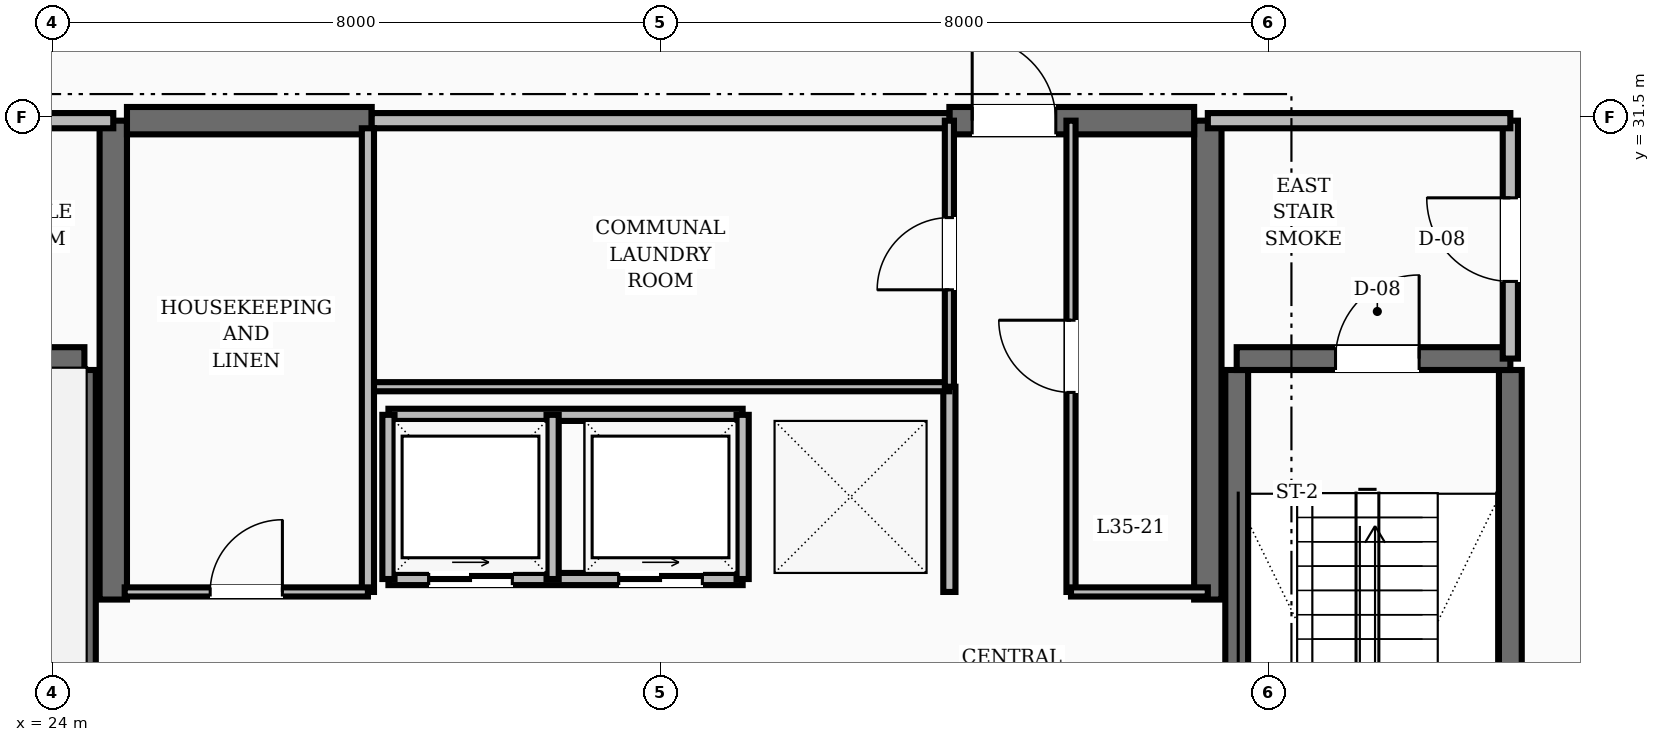
"""IFC4 building model, lengths in metres.
Left out: names, types, materials, properties, quantities, classifications, styles, units other than length and angle.
Written with IfcOpenShell. Run it as: python <this file> out.ifc"""

import sys

from ifc_helpers import new_model, si_unit, direction, frame, frame_2d, origin, place, context, subcontext, project, spatial, rectangle, extrude, element, fill, save


model = new_model("IFC4")
c1 = context("Model", 3, precision=1e-05, world=origin(), true_north=direction((0.0, 1.0)))
c2 = subcontext(c1, "Body", "Model", "MODEL_VIEW")
j1 = project(units=[si_unit("LENGTHUNIT", "METRE"), si_unit("PLANEANGLEUNIT", "RADIAN")], contexts=[c1])
p1 = place(None, origin())
s1 = spatial("IfcSite", under=j1, at=p1, CompositionType="ELEMENT")
p2 = place(p1, origin())
s2 = spatial("IfcBuilding", under=s1, at=p2, CompositionType="ELEMENT")
p3 = place(p2, frame((0.0, 0.0, 138.8)))
s3 = spatial("IfcBuildingStorey", under=s2, at=p3, CompositionType="ELEMENT", Elevation=138.8)
for number, where, z_axis, x_axis in (
    (1, (24.8, 25.15, 0.0), (0.0, 0.0, 1.0), (0.0, 1.0, 0.0)),
    (2, (39.2, 25.15, 0.0), (0.0, 0.0, 1.0), (0.0, 1.0, 0.0)),
):
    element("IfcWall", number, at=place(p3, frame(where, z_axis=z_axis, x_axis=x_axis)), inside=s3, PredefinedType="SHEAR", context=c2, shape_type="SweptSolid", body=[
        extrude(rectangle(XDim=6.3, YDim=0.36, at=frame_2d((3.15, 0.0))), origin(), (0.0, 0.0, 1.0), 3.6),
    ])
p4 = place(p3, frame((24.98, 31.45, 0.0), z_axis=(0.0, 0.0, 1.0), x_axis=(1.0, 0.0, 0.0)))
e3 = element("IfcWall", 3, at=p4, inside=s3, PredefinedType="SHEAR", context=c2, shape_type="SweptSolid", body=[
    extrude(rectangle(XDim=3.22, YDim=0.36, at=frame_2d((1.61, 0.0))), origin(), (0.0, 0.0, 1.0), 3.6),
])
p5 = place(p3, frame((35.8, 31.45, 0.0), z_axis=(0.0, 0.0, 1.0), x_axis=(1.0, 0.0, 0.0)))
e4 = element("IfcWall", 4, at=p5, inside=s3, PredefinedType="SHEAR", context=c2, shape_type="SweptSolid", body=[
    extrude(rectangle(XDim=3.22, YDim=0.36, at=frame_2d((1.61, 0.0))), origin(), (0.0, 0.0, 1.0), 3.6),
])
p6 = place(p5, frame((0.3, 0.0, 0.0)))
e5 = element("IfcOpeningElement", 5, at=p6, cuts=e4, PredefinedType="OPENING", context=c2, shape_type="SweptSolid", body=[
    extrude(rectangle(XDim=1.1, YDim=2.1, at=frame_2d((0.55, 1.05))), frame((0.0, 0.19, 0.0), z_axis=(0.0, -1.0, 0.0), x_axis=(1.0, 0.0, 0.0)), (0.0, 0.0, 1.0), 0.38),
])
p7 = place(p3, frame((24.42, 19.43, 0.0), z_axis=(0.0, 0.0, 1.0), x_axis=(0.0, 1.0, 0.0)))
e6 = element("IfcWall", 6, at=p7, inside=s3, PredefinedType="SHEAR", context=c2, shape_type="SweptSolid", body=[
    extrude(rectangle(XDim=8.74, YDim=0.3, at=frame_2d((4.37, 0.0))), origin(), (0.0, 0.0, 1.0), 3.6),
])
p8 = place(p3, frame((20.82, 28.32, 0.0), z_axis=(0.0, 0.0, 1.0), x_axis=(1.0, 0.0, 0.0)))
e7 = element("IfcWall", 7, at=p8, inside=s3, PredefinedType="SHEAR", context=c2, shape_type="SweptSolid", body=[
    extrude(rectangle(XDim=3.6, YDim=0.3, at=frame_2d((1.8, 0.0))), origin(), (0.0, 0.0, 1.0), 3.6),
])
for number, where, z_axis, x_axis in (
    (8, (43.18, 19.43, 0.0), (0.0, 0.0, 1.0), (0.0, 1.0, 0.0)),
    (9, (39.58, 19.43, 0.0), (0.0, 0.0, 1.0), (0.0, 1.0, 0.0)),
):
    element("IfcWall", number, at=place(p3, frame(where, z_axis=z_axis, x_axis=x_axis)), inside=s3, PredefinedType="SHEAR", context=c2, shape_type="SweptSolid", body=[
        extrude(rectangle(XDim=8.74, YDim=0.3, at=frame_2d((4.37, 0.0))), origin(), (0.0, 0.0, 1.0), 3.6),
    ])
p9 = place(p3, frame((39.58, 28.32, 0.0), z_axis=(0.0, 0.0, 1.0), x_axis=(1.0, 0.0, 0.0)))
e10 = element("IfcWall", 10, at=p9, inside=s3, PredefinedType="SHEAR", context=c2, shape_type="SweptSolid", body=[
    extrude(rectangle(XDim=3.6, YDim=0.3, at=frame_2d((1.8, 0.0))), origin(), (0.0, 0.0, 1.0), 3.6),
])
p10 = place(p9, frame((1.3, 0.0, 0.0)))
e11 = element("IfcOpeningElement", 11, at=p10, cuts=e10, PredefinedType="OPENING", context=c2, shape_type="SweptSolid", body=[
    extrude(rectangle(XDim=1.1, YDim=2.1, at=frame_2d((0.55, 1.05))), frame((0.0, 0.16, 0.0), z_axis=(0.0, -1.0, 0.0), x_axis=(1.0, 0.0, 0.0)), (0.0, 0.0, 1.0), 0.32),
])
p11 = place(p3, frame((43.18, 28.32, 0.0), z_axis=(0.0, 0.0, 1.0), x_axis=(0.0, 1.0, 0.0)))
e12 = element("IfcWall", 12, at=p11, inside=s3, PredefinedType="SOLIDWALL", context=c2, shape_type="SweptSolid", body=[
    extrude(rectangle(XDim=3.13, YDim=0.2, at=frame_2d((1.565, 0.0))), origin(), (0.0, 0.0, 1.0), 2.8),
])
p12 = place(p11, frame((1.015, 0.0, 0.0)))
e13 = element("IfcOpeningElement", 13, at=p12, cuts=e12, PredefinedType="OPENING", context=c2, shape_type="SweptSolid", body=[
    extrude(rectangle(XDim=1.1, YDim=2.1, at=frame_2d((0.55, 1.05))), frame((0.0, 0.11, 0.0), z_axis=(0.0, -1.0, 0.0), x_axis=(1.0, 0.0, 0.0)), (0.0, 0.0, 1.0), 0.22),
])
for number, where, z_axis, x_axis in (
    (14, (39.2, 31.45, 0.0), (0.0, 0.0, 1.0), (1.0, 0.0, 0.0)),
    (15, (20.82, 31.45, 0.0), (0.0, 0.0, 1.0), (1.0, 0.0, 0.0)),
):
    element("IfcWall", number, at=place(p3, frame(where, z_axis=z_axis, x_axis=x_axis)), inside=s3, PredefinedType="SOLIDWALL", context=c2, shape_type="SweptSolid", body=[
        extrude(rectangle(XDim=3.98, YDim=0.2, at=frame_2d((1.99, 0.0))), origin(), (0.0, 0.0, 1.0), 2.8),
    ])
p13 = place(p3, frame((35.8, 25.25, 0.0), z_axis=(0.0, 0.0, 1.0), x_axis=(0.0, 1.0, 0.0)))
e16 = element("IfcWall", 16, at=p13, inside=s3, PredefinedType="SOLIDWALL", context=c2, shape_type="SweptSolid", body=[
    extrude(rectangle(XDim=2.7, YDim=0.16, at=frame_2d((1.35, 0.0))), origin(), (0.0, 0.0, 1.0), 2.8),
])
p14 = place(p3, frame((28.42, 25.42, 0.0), z_axis=(0.0, 0.0, 1.0), x_axis=(1.0, 0.0, 0.0)))
e17 = element("IfcWall", 17, at=p14, inside=s3, PredefinedType="SOLIDWALL", context=c2, shape_type="SweptSolid", body=[
    extrude(rectangle(XDim=4.66, YDim=0.16, at=frame_2d((2.33, 0.0))), origin(), (0.0, 0.0, 1.0), 2.8),
])
p15 = place(p14, frame((0.53, 0.0, 0.0)))
e18 = element("IfcOpeningElement", 18, at=p15, cuts=e17, PredefinedType="OPENING", context=c2, shape_type="SweptSolid", body=[
    extrude(rectangle(XDim=1.1, YDim=2.15, at=frame_2d((0.55, 1.075))), frame((0.0, 0.09, 0.0), z_axis=(0.0, -1.0, 0.0), x_axis=(1.0, 0.0, 0.0)), (0.0, 0.0, 1.0), 0.18),
])
p16 = place(p14, frame((3.03, 0.0, 0.0)))
e19 = element("IfcOpeningElement", 19, at=p16, cuts=e17, PredefinedType="OPENING", context=c2, shape_type="SweptSolid", body=[
    extrude(rectangle(XDim=1.1, YDim=2.15, at=frame_2d((0.55, 1.075))), frame((0.0, 0.09, 0.0), z_axis=(0.0, -1.0, 0.0), x_axis=(1.0, 0.0, 0.0)), (0.0, 0.0, 1.0), 0.18),
])
p17 = place(p3, frame((28.42, 27.58, 0.0), z_axis=(0.0, 0.0, 1.0), x_axis=(1.0, 0.0, 0.0)))
e20 = element("IfcWall", 20, at=p17, inside=s3, PredefinedType="SOLIDWALL", context=c2, shape_type="SweptSolid", body=[
    extrude(rectangle(XDim=4.66, YDim=0.16, at=frame_2d((2.33, 0.0))), origin(), (0.0, 0.0, 1.0), 2.8),
])
for number, where, z_axis, x_axis in (
    (21, (28.42, 25.42, 0.0), (0.0, 0.0, 1.0), (0.0, 1.0, 0.0)),
    (22, (30.58, 25.42, 0.0), (0.0, 0.0, 1.0), (0.0, 1.0, 0.0)),
    (23, (33.08, 25.42, 0.0), (0.0, 0.0, 1.0), (0.0, 1.0, 0.0)),
):
    element("IfcWall", number, at=place(p3, frame(where, z_axis=z_axis, x_axis=x_axis)), inside=s3, PredefinedType="SOLIDWALL", context=c2, shape_type="SweptSolid", body=[
        extrude(rectangle(XDim=2.16, YDim=0.16, at=frame_2d((1.08, 0.0))), origin(), (0.0, 0.0, 1.0), 2.8),
    ])
p18 = place(p3, frame((28.2, 31.45, 0.0), z_axis=(0.0, 0.0, 1.0), x_axis=(1.0, 0.0, 0.0)))
e24 = element("IfcWall", 24, at=p18, inside=s3, PredefinedType="SOLIDWALL", context=c2, shape_type="SweptSolid", body=[
    extrude(rectangle(XDim=7.6, YDim=0.2, at=frame_2d((3.8, 0.0))), origin(), (0.0, 0.0, 1.0), 2.8),
])
p19 = place(p3, frame((28.2, 27.95, 0.0), z_axis=(0.0, 0.0, 1.0), x_axis=(1.0, 0.0, 0.0)))
e25 = element("IfcWall", 25, at=p19, inside=s3, PredefinedType="PARTITIONING", context=c2, shape_type="SweptSolid", body=[
    extrude(rectangle(XDim=7.6, YDim=0.12, at=frame_2d((3.8, 0.0))), origin(), (0.0, 0.0, 1.0), 2.8),
])
p20 = place(p3, frame((35.8, 27.95, 0.0), z_axis=(0.0, 0.0, 1.0), x_axis=(0.0, 1.0, 0.0)))
e26 = element("IfcWall", 26, at=p20, inside=s3, PredefinedType="PARTITIONING", context=c2, shape_type="SweptSolid", body=[
    extrude(rectangle(XDim=3.5, YDim=0.12, at=frame_2d((1.75, 0.0))), origin(), (0.0, 0.0, 1.0), 2.8),
])
p21 = place(p20, frame((1.275, 0.0, 0.0)))
e27 = element("IfcOpeningElement", 27, at=p21, cuts=e26, PredefinedType="OPENING", context=c2, shape_type="SweptSolid", body=[
    extrude(rectangle(XDim=0.95, YDim=2.1, at=frame_2d((0.475, 1.05))), frame((0.0, 0.07, 0.0), z_axis=(0.0, -1.0, 0.0), x_axis=(1.0, 0.0, 0.0)), (0.0, 0.0, 1.0), 0.14),
])
p22 = place(p3, frame((28.15, 25.25, 0.0), z_axis=(0.0, 0.0, 1.0), x_axis=(0.0, 1.0, 0.0)))
e28 = element("IfcWall", 28, at=p22, inside=s3, PredefinedType="SOLIDWALL", context=c2, shape_type="SweptSolid", body=[
    extrude(rectangle(XDim=6.1, YDim=0.16, at=frame_2d((3.05, 0.0))), origin(), (0.0, 0.0, 1.0), 2.8),
])
p23 = place(p3, frame((24.95, 25.25, 0.0), z_axis=(0.0, 0.0, 1.0), x_axis=(1.0, 0.0, 0.0)))
e29 = element("IfcWall", 29, at=p23, inside=s3, PredefinedType="PARTITIONING", context=c2, shape_type="SweptSolid", body=[
    extrude(rectangle(XDim=3.2, YDim=0.12, at=frame_2d((1.6, 0.0))), origin(), (0.0, 0.0, 1.0), 2.8),
])
p24 = place(p23, frame((1.125, 0.0, 0.0)))
e30 = element("IfcOpeningElement", 30, at=p24, cuts=e29, PredefinedType="OPENING", context=c2, shape_type="SweptSolid", body=[
    extrude(rectangle(XDim=0.95, YDim=2.1, at=frame_2d((0.475, 1.05))), frame((0.0, 0.07, 0.0), z_axis=(0.0, -1.0, 0.0), x_axis=(1.0, 0.0, 0.0)), (0.0, 0.0, 1.0), 0.14),
])
p25 = place(p3, frame((37.4, 25.25, 0.0), z_axis=(0.0, 0.0, 1.0), x_axis=(0.0, 1.0, 0.0)))
e31 = element("IfcWall", 31, at=p25, inside=s3, PredefinedType="PARTITIONING", context=c2, shape_type="SweptSolid", body=[
    extrude(rectangle(XDim=6.2, YDim=0.12, at=frame_2d((3.1, 0.0))), origin(), (0.0, 0.0, 1.0), 2.8),
])
p26 = place(p25, frame((2.625, 0.0, 0.0)))
e32 = element("IfcOpeningElement", 32, at=p26, cuts=e31, PredefinedType="OPENING", context=c2, shape_type="SweptSolid", body=[
    extrude(rectangle(XDim=0.95, YDim=2.1, at=frame_2d((0.475, 1.05))), frame((0.0, 0.07, 0.0), z_axis=(0.0, -1.0, 0.0), x_axis=(1.0, 0.0, 0.0)), (0.0, 0.0, 1.0), 0.14),
])
p27 = place(p3, frame((37.4, 25.25, 0.0), z_axis=(0.0, 0.0, 1.0), x_axis=(1.0, 0.0, 0.0)))
e33 = element("IfcWall", 33, at=p27, inside=s3, PredefinedType="PARTITIONING", context=c2, shape_type="SweptSolid", body=[
    extrude(rectangle(XDim=1.8, YDim=0.12, at=frame_2d((0.9, 0.0))), origin(), (0.0, 0.0, 1.0), 2.8),
])
p28 = place(p10, origin())
e34 = element("IfcDoor", 34, at=p28, inside=s3, OperationType="SINGLE_SWING_RIGHT", PredefinedType="DOOR", context=c2, shape_type="SweptSolid", body=[
    extrude(rectangle(XDim=1.1, YDim=2.1, at=frame_2d((0.55, 1.05))), frame((0.0, 0.025, 0.0), z_axis=(0.0, -1.0, 0.0), x_axis=(1.0, 0.0, 0.0)), (0.0, 0.0, 1.0), 0.05),
])
fill(e11, e34)
p29 = place(p12, origin())
e35 = element("IfcDoor", 35, at=p29, inside=s3, OperationType="SINGLE_SWING_RIGHT", PredefinedType="DOOR", context=c2, shape_type="SweptSolid", body=[
    extrude(rectangle(XDim=1.1, YDim=2.1, at=frame_2d((0.55, 1.05))), frame((0.0, 0.025, 0.0), z_axis=(0.0, -1.0, 0.0), x_axis=(1.0, 0.0, 0.0)), (0.0, 0.0, 1.0), 0.05),
])
fill(e13, e35)
p30 = place(p6, origin())
e36 = element("IfcDoor", 36, at=p30, inside=s3, OperationType="SINGLE_SWING_LEFT", PredefinedType="DOOR", context=c2, shape_type="SweptSolid", body=[
    extrude(rectangle(XDim=1.1, YDim=2.1, at=frame_2d((0.55, 1.05))), frame((0.0, 0.025, 0.0), z_axis=(0.0, -1.0, 0.0), x_axis=(1.0, 0.0, 0.0)), (0.0, 0.0, 1.0), 0.05),
])
fill(e5, e36)
p31 = place(p15, origin())
e37 = element("IfcDoor", 37, at=p31, inside=s3, OperationType="SLIDING_TO_RIGHT", PredefinedType="DOOR", context=c2, shape_type="SweptSolid", body=[
    extrude(rectangle(XDim=1.1, YDim=2.15, at=frame_2d((0.55, 1.075))), frame((0.0, 0.025, 0.0), z_axis=(0.0, -1.0, 0.0), x_axis=(1.0, 0.0, 0.0)), (0.0, 0.0, 1.0), 0.05),
])
fill(e18, e37)
p32 = place(p16, origin())
e38 = element("IfcDoor", 38, at=p32, inside=s3, OperationType="SLIDING_TO_RIGHT", PredefinedType="DOOR", context=c2, shape_type="SweptSolid", body=[
    extrude(rectangle(XDim=1.1, YDim=2.15, at=frame_2d((0.55, 1.075))), frame((0.0, 0.025, 0.0), z_axis=(0.0, -1.0, 0.0), x_axis=(1.0, 0.0, 0.0)), (0.0, 0.0, 1.0), 0.05),
])
fill(e19, e38)
p33 = place(p21, origin())
e39 = element("IfcDoor", 39, at=p33, inside=s3, OperationType="SINGLE_SWING_LEFT", PredefinedType="DOOR", context=c2, shape_type="SweptSolid", body=[
    extrude(rectangle(XDim=0.95, YDim=2.1, at=frame_2d((0.475, 1.05))), frame((0.0, 0.025, 0.0), z_axis=(0.0, -1.0, 0.0), x_axis=(1.0, 0.0, 0.0)), (0.0, 0.0, 1.0), 0.05),
])
fill(e27, e39)
p34 = place(p24, origin())
e40 = element("IfcDoor", 40, at=p34, inside=s3, OperationType="SINGLE_SWING_RIGHT", PredefinedType="DOOR", context=c2, shape_type="SweptSolid", body=[
    extrude(rectangle(XDim=0.95, YDim=2.1, at=frame_2d((0.475, 1.05))), frame((0.0, 0.025, 0.0), z_axis=(0.0, -1.0, 0.0), x_axis=(1.0, 0.0, 0.0)), (0.0, 0.0, 1.0), 0.05),
])
fill(e30, e40)
p35 = place(p26, origin())
e41 = element("IfcDoor", 41, at=p35, inside=s3, OperationType="SINGLE_SWING_RIGHT", PredefinedType="DOOR", context=c2, shape_type="SweptSolid", body=[
    extrude(rectangle(XDim=0.95, YDim=2.1, at=frame_2d((0.475, 1.05))), frame((0.0, 0.025, 0.0), z_axis=(0.0, -1.0, 0.0), x_axis=(1.0, 0.0, 0.0)), (0.0, 0.0, 1.0), 0.05),
])
fill(e32, e41)
save(model, sys.argv[1])
